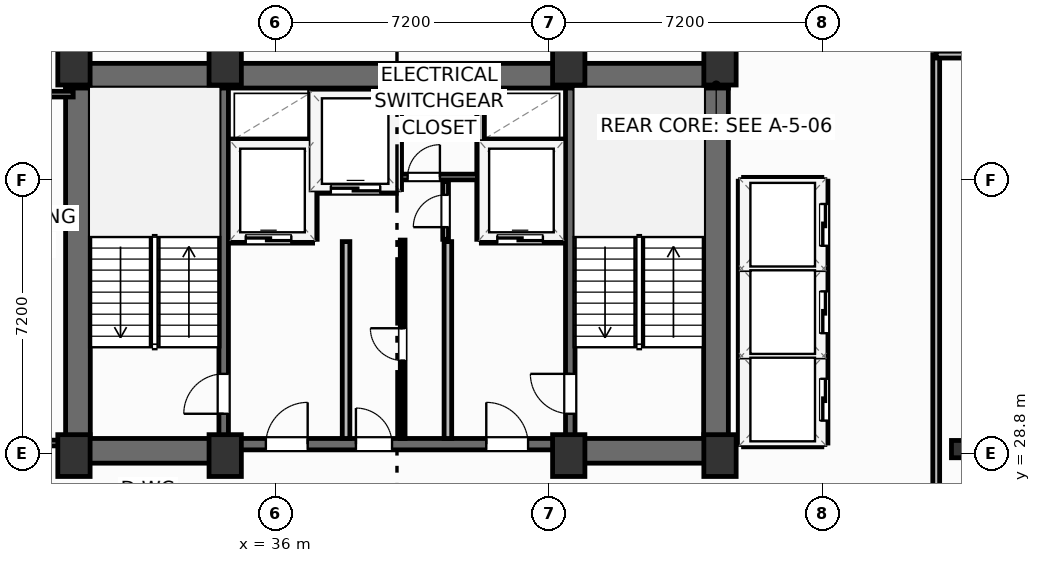
"""IFC4 building model, lengths in metres.
Left out: names, types, materials, properties, quantities, classifications, styles, units other than length and angle.
Written with IfcOpenShell. Run it as: python <this file> out.ifc"""

import sys

from ifc_helpers import new_model, si_unit, direction, frame, frame_2d, origin, origin_2d, place, context, subcontext, project, spatial, rectangle, i_section, extrude, element, fill, save


model = new_model("IFC4")
c1 = context("Model", 3, precision=1e-05, world=origin(), true_north=direction((0.0, 1.0)))
c2 = subcontext(c1, "Body", "Model", "MODEL_VIEW")
j1 = project(units=[si_unit("LENGTHUNIT", "METRE"), si_unit("PLANEANGLEUNIT", "RADIAN")], contexts=[c1])
p1 = place(None, origin())
s1 = spatial("IfcSite", under=j1, at=p1, CompositionType="ELEMENT")
p2 = place(p1, origin())
s2 = spatial("IfcBuilding", under=s1, at=p2, CompositionType="ELEMENT")
p3 = place(p2, frame((0.0, 0.0, 200.5)))
s3 = spatial("IfcBuildingStorey", under=s2, at=p3, CompositionType="ELEMENT", Elevation=200.5)
for number, where, z_axis, x_axis in (
    (1, (30.7, 28.75, 0.0), (0.0, 0.0, 1.0), (1.0, 0.0, 0.0)),
    (2, (34.68, 28.75, 0.0), (0.0, 0.0, 1.0), (1.0, 0.0, 0.0)),
    (3, (43.72, 28.75, 0.0), (0.0, 0.0, 1.0), (1.0, 0.0, 0.0)),
    (4, (47.7, 28.75, 0.0), (0.0, 0.0, 1.0), (1.0, 0.0, 0.0)),
    (5, (30.7, 39.05, 0.0), (0.0, 0.0, 1.0), (1.0, 0.0, 0.0)),
    (6, (34.68, 39.05, 0.0), (0.0, 0.0, 1.0), (1.0, 0.0, 0.0)),
    (7, (43.72, 39.05, 0.0), (0.0, 0.0, 1.0), (1.0, 0.0, 0.0)),
    (8, (47.7, 39.05, 0.0), (0.0, 0.0, 1.0), (1.0, 0.0, 0.0)),
):
    element("IfcColumn", number, at=place(p3, frame(where, z_axis=z_axis, x_axis=x_axis)), inside=s3, PredefinedType="COLUMN", context=c2, shape_type="SweptSolid", body=[
        extrude(rectangle(XDim=0.85, YDim=1.1, at=origin_2d()), origin(), (0.0, 0.0, 1.0), 3.7),
    ])
p4 = place(p3, frame((54.0, 28.92, 0.0), z_axis=(0.0, 0.0, 1.0), x_axis=(1.0, 0.0, 0.0)))
e9 = element("IfcColumn", 9, at=p4, inside=s3, PredefinedType="COLUMN", context=c2, shape_type="SweptSolid", body=[
    extrude(i_section(OverallWidth=0.418, OverallDepth=0.455, WebThickness=0.042, FlangeThickness=0.068, FilletRadius=0.025, at=origin_2d()), origin(), (0.0, 0.0, 1.0), 3.7),
])
p5 = place(p3, frame((30.48, 38.745, 0.0), z_axis=(0.0, 0.0, 1.0), x_axis=(1.0, 0.0, 0.0)))
e10 = element("IfcWall", 10, at=p5, inside=s3, PredefinedType="SHEAR", context=c2, shape_type="SweptSolid", body=[
    extrude(rectangle(XDim=17.44, YDim=0.65, at=frame_2d((8.72, 0.0))), origin(), (0.0, 0.0, 1.0), 3.45),
])
for number, where, z_axis, x_axis in (
    (11, (30.805, 29.2, 0.0), (0.0, 0.0, 1.0), (0.0, 1.0, 0.0)),
    (12, (47.595, 29.2, 0.0), (0.0, 0.0, 1.0), (0.0, 1.0, 0.0)),
):
    element("IfcWall", number, at=place(p3, frame(where, z_axis=z_axis, x_axis=x_axis)), inside=s3, PredefinedType="SHEAR", context=c2, shape_type="SweptSolid", body=[
        extrude(rectangle(XDim=9.22, YDim=0.65, at=frame_2d((4.61, 0.0))), origin(), (0.0, 0.0, 1.0), 3.45),
    ])
p6 = place(p3, frame((30.48, 28.875, 0.0), z_axis=(0.0, 0.0, 1.0), x_axis=(1.0, 0.0, 0.0)))
e13 = element("IfcWall", 13, at=p6, inside=s3, PredefinedType="SHEAR", context=c2, shape_type="SweptSolid", body=[
    extrude(rectangle(XDim=4.32, YDim=0.65, at=frame_2d((2.16, 0.0))), origin(), (0.0, 0.0, 1.0), 3.45),
])
p7 = place(p3, frame((43.6, 28.875, 0.0), z_axis=(0.0, 0.0, 1.0), x_axis=(1.0, 0.0, 0.0)))
e14 = element("IfcWall", 14, at=p7, inside=s3, PredefinedType="SHEAR", context=c2, shape_type="SweptSolid", body=[
    extrude(rectangle(XDim=4.32, YDim=0.65, at=frame_2d((2.16, 0.0))), origin(), (0.0, 0.0, 1.0), 3.45),
])
p8 = place(p3, frame((34.8, 29.05, 0.0), z_axis=(0.0, 0.0, 1.0), x_axis=(1.0, 0.0, 0.0)))
e15 = element("IfcWall", 15, at=p8, inside=s3, PredefinedType="SHEAR", context=c2, shape_type="SweptSolid", body=[
    extrude(rectangle(XDim=8.8, YDim=0.3, at=frame_2d((4.4, 0.0))), origin(), (0.0, 0.0, 1.0), 3.45),
])
p9 = place(p8, frame((0.95, 0.0, 0.0)))
e16 = element("IfcOpeningElement", 16, at=p9, cuts=e15, PredefinedType="OPENING", context=c2, shape_type="SweptSolid", body=[
    extrude(rectangle(XDim=1.1, YDim=2.15, at=frame_2d((0.55, 1.075))), frame((0.0, 0.16, 0.0), z_axis=(0.0, -1.0, 0.0), x_axis=(1.0, 0.0, 0.0)), (0.0, 0.0, 1.0), 0.32),
])
p10 = place(p8, frame((6.75, 0.0, 0.0)))
e17 = element("IfcOpeningElement", 17, at=p10, cuts=e15, PredefinedType="OPENING", context=c2, shape_type="SweptSolid", body=[
    extrude(rectangle(XDim=1.1, YDim=2.15, at=frame_2d((0.55, 1.075))), frame((0.0, 0.16, 0.0), z_axis=(0.0, -1.0, 0.0), x_axis=(1.0, 0.0, 0.0)), (0.0, 0.0, 1.0), 0.32),
])
p11 = place(p8, frame((3.32, 0.0, 0.0)))
e18 = element("IfcOpeningElement", 18, at=p11, cuts=e15, PredefinedType="OPENING", context=c2, shape_type="SweptSolid", body=[
    extrude(rectangle(XDim=0.95, YDim=2.15, at=frame_2d((0.475, 1.075))), frame((0.0, 0.16, 0.0), z_axis=(0.0, -1.0, 0.0), x_axis=(1.0, 0.0, 0.0)), (0.0, 0.0, 1.0), 0.32),
])
p12 = place(p3, frame((34.64, 29.2, 0.0), z_axis=(0.0, 0.0, 1.0), x_axis=(0.0, 1.0, 0.0)))
e19 = element("IfcWall", 19, at=p12, inside=s3, PredefinedType="SHEAR", context=c2, shape_type="SweptSolid", body=[
    extrude(rectangle(XDim=9.22, YDim=0.25, at=frame_2d((4.61, 0.0))), origin(), (0.0, 0.0, 1.0), 3.45),
])
p13 = place(p12, frame((0.65, 0.0, 0.0)))
e20 = element("IfcOpeningElement", 20, at=p13, cuts=e19, PredefinedType="OPENING", context=c2, shape_type="SweptSolid", body=[
    extrude(rectangle(XDim=1.05, YDim=2.15, at=frame_2d((0.525, 1.075))), frame((0.0, 0.135, 0.0), z_axis=(0.0, -1.0, 0.0), x_axis=(1.0, 0.0, 0.0)), (0.0, 0.0, 1.0), 0.27),
])
p14 = place(p3, frame((43.76, 29.2, 0.0), z_axis=(0.0, 0.0, 1.0), x_axis=(0.0, 1.0, 0.0)))
e21 = element("IfcWall", 21, at=p14, inside=s3, PredefinedType="SHEAR", context=c2, shape_type="SweptSolid", body=[
    extrude(rectangle(XDim=9.22, YDim=0.25, at=frame_2d((4.61, 0.0))), origin(), (0.0, 0.0, 1.0), 3.45),
])
p15 = place(p14, frame((0.65, 0.0, 0.0)))
e22 = element("IfcOpeningElement", 22, at=p15, cuts=e21, PredefinedType="OPENING", context=c2, shape_type="SweptSolid", body=[
    extrude(rectangle(XDim=1.05, YDim=2.15, at=frame_2d((0.525, 1.075))), frame((0.0, 0.135, 0.0), z_axis=(0.0, -1.0, 0.0), x_axis=(1.0, 0.0, 0.0)), (0.0, 0.0, 1.0), 0.27),
])
p16 = place(p3, frame((53.45, 39.3, 0.0), z_axis=(0.0, 0.0, 1.0), x_axis=(0.0, 1.0, 0.0)))
e23 = element("IfcWall", 23, at=p16, inside=s3, PredefinedType="PARTITIONING", context=c2, shape_type="SweptSolid", body=[
    extrude(rectangle(XDim=2.31, YDim=0.125, at=frame_2d((1.155, 0.0))), origin(), (0.0, 0.0, 1.0), 3.45),
])
p17 = place(p3, frame((53.39, 19.24, 0.0), z_axis=(0.0, 0.0, 1.0), x_axis=(0.0, 1.0, 0.0)))
e24 = element("IfcWall", 24, at=p17, inside=s3, PredefinedType="PARTITIONING", context=c2, shape_type="SweptSolid", body=[
    extrude(rectangle(XDim=20.06, YDim=0.18, at=frame_2d((10.03, 0.0))), origin(), (0.0, 0.0, 1.0), 3.45),
])
p18 = place(p17, frame((7.7, 0.0, 0.0)))
e25 = element("IfcOpeningElement", 25, at=p18, cuts=e24, PredefinedType="OPENING", context=c2, shape_type="SweptSolid", body=[
    extrude(rectangle(XDim=0.95, YDim=2.05, at=frame_2d((0.475, 1.025))), frame((0.0, 0.1, 0.0), z_axis=(0.0, -1.0, 0.0), x_axis=(1.0, 0.0, 0.0)), (0.0, 0.0, 1.0), 0.2),
])
p19 = place(p3, frame((53.39, 39.3, 0.0), z_axis=(0.0, 0.0, 1.0), x_axis=(1.0, 0.0, 0.0)))
e26 = element("IfcWall", 26, at=p19, inside=s3, PredefinedType="PARTITIONING", context=c2, shape_type="SweptSolid", body=[
    extrude(rectangle(XDim=19.49, YDim=0.18, at=frame_2d((9.745, 0.0))), origin(), (0.0, 0.0, 1.0), 3.45),
])
for number, where, z_axis, x_axis in (
    (27, (37.86, 29.2, 0.0), (0.0, 0.0, 1.0), (0.0, 1.0, 0.0)),
    (28, (40.54, 29.2, 0.0), (0.0, 0.0, 1.0), (0.0, 1.0, 0.0)),
):
    element("IfcWall", number, at=place(p3, frame(where, z_axis=z_axis, x_axis=x_axis)), inside=s3, PredefinedType="PARTITIONING", context=c2, shape_type="SweptSolid", body=[
        extrude(rectangle(XDim=5.18, YDim=0.2, at=frame_2d((2.59, 0.0))), origin(), (0.0, 0.0, 1.0), 3.45),
    ])
p20 = place(p3, frame((34.8, 34.44, 0.0), z_axis=(0.0, 0.0, 1.0), x_axis=(1.0, 0.0, 0.0)))
e29 = element("IfcWall", 29, at=p20, inside=s3, PredefinedType="PARTITIONING", context=c2, shape_type="SweptSolid", body=[
    extrude(rectangle(XDim=2.18, YDim=0.2, at=frame_2d((1.09, 0.0))), origin(), (0.0, 0.0, 1.0), 3.45),
])
p21 = place(p20, frame((0.42, 0.0, 0.0)))
e30 = element("IfcOpeningElement", 30, at=p21, cuts=e29, PredefinedType="OPENING", context=c2, shape_type="SweptSolid", body=[
    extrude(rectangle(XDim=1.2, YDim=2.2, at=frame_2d((0.6, 1.1))), frame((0.0, 0.11, 0.0), z_axis=(0.0, -1.0, 0.0), x_axis=(1.0, 0.0, 0.0)), (0.0, 0.0, 1.0), 0.22),
])
p22 = place(p3, frame((34.8, 36.98, 0.0), z_axis=(0.0, 0.0, 1.0), x_axis=(1.0, 0.0, 0.0)))
e31 = element("IfcWall", 31, at=p22, inside=s3, PredefinedType="PARTITIONING", context=c2, shape_type="SweptSolid", body=[
    extrude(rectangle(XDim=2.18, YDim=0.2, at=frame_2d((1.09, 0.0))), origin(), (0.0, 0.0, 1.0), 3.45),
])
p23 = place(p3, frame((37.0, 34.44, 0.0), z_axis=(0.0, 0.0, 1.0), x_axis=(0.0, 1.0, 0.0)))
e32 = element("IfcWall", 32, at=p23, inside=s3, PredefinedType="PARTITIONING", context=c2, shape_type="SweptSolid", body=[
    extrude(rectangle(XDim=3.9, YDim=0.2, at=frame_2d((1.95, 0.0))), origin(), (0.0, 0.0, 1.0), 3.45),
])
p24 = place(p3, frame((41.42, 34.44, 0.0), z_axis=(0.0, 0.0, 1.0), x_axis=(1.0, 0.0, 0.0)))
e33 = element("IfcWall", 33, at=p24, inside=s3, PredefinedType="PARTITIONING", context=c2, shape_type="SweptSolid", body=[
    extrude(rectangle(XDim=2.18, YDim=0.2, at=frame_2d((1.09, 0.0))), origin(), (0.0, 0.0, 1.0), 3.45),
])
p25 = place(p24, frame((0.42, 0.0, 0.0)))
e34 = element("IfcOpeningElement", 34, at=p25, cuts=e33, PredefinedType="OPENING", context=c2, shape_type="SweptSolid", body=[
    extrude(rectangle(XDim=1.2, YDim=2.2, at=frame_2d((0.6, 1.1))), frame((0.0, 0.11, 0.0), z_axis=(0.0, -1.0, 0.0), x_axis=(1.0, 0.0, 0.0)), (0.0, 0.0, 1.0), 0.22),
])
p26 = place(p3, frame((41.42, 36.98, 0.0), z_axis=(0.0, 0.0, 1.0), x_axis=(1.0, 0.0, 0.0)))
e35 = element("IfcWall", 35, at=p26, inside=s3, PredefinedType="PARTITIONING", context=c2, shape_type="SweptSolid", body=[
    extrude(rectangle(XDim=2.18, YDim=0.2, at=frame_2d((1.09, 0.0))), origin(), (0.0, 0.0, 1.0), 3.45),
])
p27 = place(p3, frame((41.4, 34.44, 0.0), z_axis=(0.0, 0.0, 1.0), x_axis=(0.0, 1.0, 0.0)))
e36 = element("IfcWall", 36, at=p27, inside=s3, PredefinedType="PARTITIONING", context=c2, shape_type="SweptSolid", body=[
    extrude(rectangle(XDim=3.9, YDim=0.2, at=frame_2d((1.95, 0.0))), origin(), (0.0, 0.0, 1.0), 3.45),
])
p28 = place(p3, frame((37.06, 35.75, 0.0), z_axis=(0.0, 0.0, 1.0), x_axis=(1.0, 0.0, 0.0)))
e37 = element("IfcWall", 37, at=p28, inside=s3, PredefinedType="PARTITIONING", context=c2, shape_type="SweptSolid", body=[
    extrude(rectangle(XDim=2.12, YDim=0.2, at=frame_2d((1.06, 0.0))), origin(), (0.0, 0.0, 1.0), 3.45),
])
p29 = place(p28, frame((0.4, 0.0, 0.0)))
e38 = element("IfcOpeningElement", 38, at=p29, cuts=e37, PredefinedType="OPENING", context=c2, shape_type="SweptSolid", body=[
    extrude(rectangle(XDim=1.3, YDim=2.2, at=frame_2d((0.65, 1.1))), frame((0.0, 0.11, 0.0), z_axis=(0.0, -1.0, 0.0), x_axis=(1.0, 0.0, 0.0)), (0.0, 0.0, 1.0), 0.22),
])
p30 = place(p3, frame((39.22, 35.75, 0.0), z_axis=(0.0, 0.0, 1.0), x_axis=(0.0, 1.0, 0.0)))
e39 = element("IfcWall", 39, at=p30, inside=s3, PredefinedType="PARTITIONING", context=c2, shape_type="SweptSolid", body=[
    extrude(rectangle(XDim=2.59, YDim=0.2, at=frame_2d((1.295, 0.0))), origin(), (0.0, 0.0, 1.0), 3.45),
])
p31 = place(p3, frame((39.3, 36.08, 0.0), z_axis=(0.0, 0.0, 1.0), x_axis=(1.0, 0.0, 0.0)))
e40 = element("IfcWall", 40, at=p31, inside=s3, PredefinedType="PARTITIONING", context=c2, shape_type="SweptSolid", body=[
    extrude(rectangle(XDim=2.02, YDim=0.15, at=frame_2d((1.01, 0.0))), origin(), (0.0, 0.0, 1.0), 3.45),
])
p32 = place(p31, frame((0.18, 0.0, 0.0)))
e41 = element("IfcOpeningElement", 41, at=p32, cuts=e40, PredefinedType="OPENING", context=c2, shape_type="SweptSolid", body=[
    extrude(rectangle(XDim=0.85, YDim=2.05, at=frame_2d((0.425, 1.025))), frame((0.0, 0.085, 0.0), z_axis=(0.0, -1.0, 0.0), x_axis=(1.0, 0.0, 0.0)), (0.0, 0.0, 1.0), 0.17),
])
p33 = place(p3, frame((40.48, 34.44, 0.0), z_axis=(0.0, 0.0, 1.0), x_axis=(0.0, 1.0, 0.0)))
e42 = element("IfcWall", 42, at=p33, inside=s3, PredefinedType="PARTITIONING", context=c2, shape_type="SweptSolid", body=[
    extrude(rectangle(XDim=1.52, YDim=0.15, at=frame_2d((0.76, 0.0))), origin(), (0.0, 0.0, 1.0), 3.45),
])
p34 = place(p33, frame((0.32, 0.0, 0.0)))
e43 = element("IfcOpeningElement", 43, at=p34, cuts=e42, PredefinedType="OPENING", context=c2, shape_type="SweptSolid", body=[
    extrude(rectangle(XDim=0.85, YDim=2.05, at=frame_2d((0.425, 1.025))), frame((0.0, 0.085, 0.0), z_axis=(0.0, -1.0, 0.0), x_axis=(1.0, 0.0, 0.0)), (0.0, 0.0, 1.0), 0.17),
])
p35 = place(p3, frame((39.35, 29.2, 0.0), z_axis=(0.0, 0.0, 1.0), x_axis=(0.0, 1.0, 0.0)))
e44 = element("IfcWall", 44, at=p35, inside=s3, PredefinedType="PARTITIONING", context=c2, shape_type="SweptSolid", body=[
    extrude(rectangle(XDim=5.22, YDim=0.125, at=frame_2d((2.61, 0.0))), origin(), (0.0, 0.0, 1.0), 3.45),
])
p36 = place(p35, frame((2.05, 0.0, 0.0)))
e45 = element("IfcOpeningElement", 45, at=p36, cuts=e44, PredefinedType="OPENING", context=c2, shape_type="SweptSolid", body=[
    extrude(rectangle(XDim=0.85, YDim=2.05, at=frame_2d((0.425, 1.025))), frame((0.0, 0.073, 0.0), z_axis=(0.0, -1.0, 0.0), x_axis=(1.0, 0.0, 0.0)), (0.0, 0.0, 1.0), 0.145),
])
p37 = place(p3, frame((26.78, 29.08, 0.0), z_axis=(0.0, 0.0, 1.0), x_axis=(1.0, 0.0, 0.0)))
e46 = element("IfcWall", 46, at=p37, inside=s3, PredefinedType="PARTITIONING", context=c2, shape_type="SweptSolid", body=[
    extrude(rectangle(XDim=3.7, YDim=0.15, at=frame_2d((1.85, 0.0))), origin(), (0.0, 0.0, 1.0), 3.45),
])
p38 = place(p3, frame((26.78, 38.26, 0.0), z_axis=(0.0, 0.0, 1.0), x_axis=(1.0, 0.0, 0.0)))
e47 = element("IfcWall", 47, at=p38, inside=s3, PredefinedType="PARTITIONING", context=c2, shape_type="SweptSolid", body=[
    extrude(rectangle(XDim=3.9, YDim=0.15, at=frame_2d((1.95, 0.0))), origin(), (0.0, 0.0, 1.0), 3.45),
])
for number, where, z_axis, x_axis in (
    (48, (48.32, 31.375, 0.0), (0.0, 0.0, 1.0), (1.0, 0.0, 0.0)),
    (49, (48.32, 33.675, 0.0), (0.0, 0.0, 1.0), (1.0, 0.0, 0.0)),
):
    element("IfcWall", number, at=place(p3, frame(where, z_axis=z_axis, x_axis=x_axis)), inside=s3, PredefinedType="PARTITIONING", context=c2, shape_type="SweptSolid", body=[
        extrude(rectangle(XDim=2.06, YDim=0.2, at=frame_2d((1.03, 0.0))), origin(), (0.0, 0.0, 1.0), 3.45),
    ])
p39 = place(p3, frame((48.32, 29.08, 0.0), z_axis=(0.0, 0.0, 1.0), x_axis=(1.0, 0.0, 0.0)))
e50 = element("IfcWall", 50, at=p39, inside=s3, PredefinedType="PARTITIONING", context=c2, shape_type="SweptSolid", body=[
    extrude(rectangle(XDim=2.06, YDim=0.2, at=frame_2d((1.03, 0.0))), origin(), (0.0, 0.0, 1.0), 2.662),
])
p40 = place(p3, frame((48.32, 35.97, 0.0), z_axis=(0.0, 0.0, 1.0), x_axis=(1.0, 0.0, 0.0)))
e51 = element("IfcWall", 51, at=p40, inside=s3, PredefinedType="PARTITIONING", context=c2, shape_type="SweptSolid", body=[
    extrude(rectangle(XDim=2.06, YDim=0.2, at=frame_2d((1.03, 0.0))), origin(), (0.0, 0.0, 1.0), 3.45),
])
p41 = place(p3, frame((48.28, 29.08, 0.0), z_axis=(0.0, 0.0, 1.0), x_axis=(0.0, 1.0, 0.0)))
e52 = element("IfcWall", 52, at=p41, inside=s3, PredefinedType="PARTITIONING", context=c2, shape_type="SweptSolid", body=[
    extrude(rectangle(XDim=6.89, YDim=0.2, at=frame_2d((3.445, 0.0))), origin(), (0.0, 0.0, 1.0), 3.45),
])
p42 = place(p3, frame((50.44, 29.08, 0.0), z_axis=(0.0, 0.0, 1.0), x_axis=(0.0, 1.0, 0.0)))
e53 = element("IfcWall", 53, at=p42, inside=s3, PredefinedType="PARTITIONING", context=c2, shape_type="SweptSolid", body=[
    extrude(rectangle(XDim=6.89, YDim=0.2, at=frame_2d((3.445, 0.0))), origin(), (0.0, 0.0, 1.0), 3.45),
])
p43 = place(p42, frame((0.59, 0.0, 0.0)))
e54 = element("IfcOpeningElement", 54, at=p43, cuts=e53, PredefinedType="OPENING", context=c2, shape_type="SweptSolid", body=[
    extrude(rectangle(XDim=1.1, YDim=2.15, at=frame_2d((0.55, 1.075))), frame((0.0, 0.11, 0.0), z_axis=(0.0, -1.0, 0.0), x_axis=(1.0, 0.0, 0.0)), (0.0, 0.0, 1.0), 0.22),
])
p44 = place(p42, frame((2.89, 0.0, 0.0)))
e55 = element("IfcOpeningElement", 55, at=p44, cuts=e53, PredefinedType="OPENING", context=c2, shape_type="SweptSolid", body=[
    extrude(rectangle(XDim=1.1, YDim=2.15, at=frame_2d((0.55, 1.075))), frame((0.0, 0.11, 0.0), z_axis=(0.0, -1.0, 0.0), x_axis=(1.0, 0.0, 0.0)), (0.0, 0.0, 1.0), 0.22),
])
p45 = place(p42, frame((5.19, 0.0, 0.0)))
e56 = element("IfcOpeningElement", 56, at=p45, cuts=e53, PredefinedType="OPENING", context=c2, shape_type="SweptSolid", body=[
    extrude(rectangle(XDim=1.1, YDim=2.15, at=frame_2d((0.55, 1.075))), frame((0.0, 0.11, 0.0), z_axis=(0.0, -1.0, 0.0), x_axis=(1.0, 0.0, 0.0)), (0.0, 0.0, 1.0), 0.22),
])
p46 = place(p13, origin())
e57 = element("IfcDoor", 57, at=p46, inside=s3, OperationType="SINGLE_SWING_LEFT", PredefinedType="DOOR", context=c2, shape_type="SweptSolid", body=[
    extrude(rectangle(XDim=1.05, YDim=2.15, at=frame_2d((0.525, 1.075))), frame((0.0, 0.025, 0.0), z_axis=(0.0, -1.0, 0.0), x_axis=(1.0, 0.0, 0.0)), (0.0, 0.0, 1.0), 0.05),
])
fill(e20, e57)
p47 = place(p15, origin())
e58 = element("IfcDoor", 58, at=p47, inside=s3, OperationType="SINGLE_SWING_RIGHT", PredefinedType="DOOR", context=c2, shape_type="SweptSolid", body=[
    extrude(rectangle(XDim=1.05, YDim=2.15, at=frame_2d((0.525, 1.075))), frame((0.0, 0.025, 0.0), z_axis=(0.0, -1.0, 0.0), x_axis=(1.0, 0.0, 0.0)), (0.0, 0.0, 1.0), 0.05),
])
fill(e22, e58)
p48 = place(p9, origin())
e59 = element("IfcDoor", 59, at=p48, inside=s3, OperationType="SINGLE_SWING_RIGHT", PredefinedType="DOOR", context=c2, shape_type="SweptSolid", body=[
    extrude(rectangle(XDim=1.1, YDim=2.15, at=frame_2d((0.55, 1.075))), frame((0.0, 0.025, 0.0), z_axis=(0.0, -1.0, 0.0), x_axis=(1.0, 0.0, 0.0)), (0.0, 0.0, 1.0), 0.05),
])
fill(e16, e59)
p49 = place(p10, origin())
e60 = element("IfcDoor", 60, at=p49, inside=s3, OperationType="SINGLE_SWING_LEFT", PredefinedType="DOOR", context=c2, shape_type="SweptSolid", body=[
    extrude(rectangle(XDim=1.1, YDim=2.15, at=frame_2d((0.55, 1.075))), frame((0.0, 0.025, 0.0), z_axis=(0.0, -1.0, 0.0), x_axis=(1.0, 0.0, 0.0)), (0.0, 0.0, 1.0), 0.05),
])
fill(e17, e60)
p50 = place(p21, origin())
e61 = element("IfcDoor", 61, at=p50, inside=s3, OperationType="SLIDING_TO_LEFT", PredefinedType="DOOR", context=c2, shape_type="SweptSolid", body=[
    extrude(rectangle(XDim=1.2, YDim=2.2, at=frame_2d((0.6, 1.1))), frame((0.0, 0.025, 0.0), z_axis=(0.0, -1.0, 0.0), x_axis=(1.0, 0.0, 0.0)), (0.0, 0.0, 1.0), 0.05),
])
fill(e30, e61)
p51 = place(p25, origin())
e62 = element("IfcDoor", 62, at=p51, inside=s3, OperationType="SLIDING_TO_LEFT", PredefinedType="DOOR", context=c2, shape_type="SweptSolid", body=[
    extrude(rectangle(XDim=1.2, YDim=2.2, at=frame_2d((0.6, 1.1))), frame((0.0, 0.025, 0.0), z_axis=(0.0, -1.0, 0.0), x_axis=(1.0, 0.0, 0.0)), (0.0, 0.0, 1.0), 0.05),
])
fill(e34, e62)
p52 = place(p29, origin())
e63 = element("IfcDoor", 63, at=p52, inside=s3, OperationType="SLIDING_TO_LEFT", PredefinedType="DOOR", context=c2, shape_type="SweptSolid", body=[
    extrude(rectangle(XDim=1.3, YDim=2.2, at=frame_2d((0.65, 1.1))), frame((0.0, 0.025, 0.0), z_axis=(0.0, -1.0, 0.0), x_axis=(1.0, 0.0, 0.0)), (0.0, 0.0, 1.0), 0.05),
])
fill(e38, e63)
p53 = place(p32, origin())
e64 = element("IfcDoor", 64, at=p53, inside=s3, OperationType="SINGLE_SWING_RIGHT", PredefinedType="DOOR", context=c2, shape_type="SweptSolid", body=[
    extrude(rectangle(XDim=0.85, YDim=2.05, at=frame_2d((0.425, 1.025))), frame((0.0, 0.025, 0.0), z_axis=(0.0, -1.0, 0.0), x_axis=(1.0, 0.0, 0.0)), (0.0, 0.0, 1.0), 0.05),
])
fill(e41, e64)
p54 = place(p34, origin())
e65 = element("IfcDoor", 65, at=p54, inside=s3, OperationType="SINGLE_SWING_LEFT", PredefinedType="DOOR", context=c2, shape_type="SweptSolid", body=[
    extrude(rectangle(XDim=0.85, YDim=2.05, at=frame_2d((0.425, 1.025))), frame((0.0, 0.025, 0.0), z_axis=(0.0, -1.0, 0.0), x_axis=(1.0, 0.0, 0.0)), (0.0, 0.0, 1.0), 0.05),
])
fill(e43, e65)
p55 = place(p36, origin())
e66 = element("IfcDoor", 66, at=p55, inside=s3, OperationType="SINGLE_SWING_RIGHT", PredefinedType="DOOR", context=c2, shape_type="SweptSolid", body=[
    extrude(rectangle(XDim=0.85, YDim=2.05, at=frame_2d((0.425, 1.025))), frame((0.0, 0.025, 0.0), z_axis=(0.0, -1.0, 0.0), x_axis=(1.0, 0.0, 0.0)), (0.0, 0.0, 1.0), 0.05),
])
fill(e45, e66)
p56 = place(p11, origin())
e67 = element("IfcDoor", 67, at=p56, inside=s3, OperationType="SINGLE_SWING_LEFT", PredefinedType="DOOR", context=c2, shape_type="SweptSolid", body=[
    extrude(rectangle(XDim=0.95, YDim=2.15, at=frame_2d((0.475, 1.075))), frame((0.0, 0.025, 0.0), z_axis=(0.0, -1.0, 0.0), x_axis=(1.0, 0.0, 0.0)), (0.0, 0.0, 1.0), 0.05),
])
fill(e18, e67)
p57 = place(p43, origin())
e68 = element("IfcDoor", 68, at=p57, inside=s3, OperationType="SLIDING_TO_LEFT", PredefinedType="DOOR", context=c2, shape_type="SweptSolid", body=[
    extrude(rectangle(XDim=1.1, YDim=2.15, at=frame_2d((0.55, 1.075))), frame((0.0, 0.025, 0.0), z_axis=(0.0, -1.0, 0.0), x_axis=(1.0, 0.0, 0.0)), (0.0, 0.0, 1.0), 0.05),
])
fill(e54, e68)
p58 = place(p44, origin())
e69 = element("IfcDoor", 69, at=p58, inside=s3, OperationType="SLIDING_TO_LEFT", PredefinedType="DOOR", context=c2, shape_type="SweptSolid", body=[
    extrude(rectangle(XDim=1.1, YDim=2.15, at=frame_2d((0.55, 1.075))), frame((0.0, 0.025, 0.0), z_axis=(0.0, -1.0, 0.0), x_axis=(1.0, 0.0, 0.0)), (0.0, 0.0, 1.0), 0.05),
])
fill(e55, e69)
p59 = place(p45, origin())
e70 = element("IfcDoor", 70, at=p59, inside=s3, OperationType="SLIDING_TO_LEFT", PredefinedType="DOOR", context=c2, shape_type="SweptSolid", body=[
    extrude(rectangle(XDim=1.1, YDim=2.15, at=frame_2d((0.55, 1.075))), frame((0.0, 0.025, 0.0), z_axis=(0.0, -1.0, 0.0), x_axis=(1.0, 0.0, 0.0)), (0.0, 0.0, 1.0), 0.05),
])
fill(e56, e70)
save(model, sys.argv[1])
